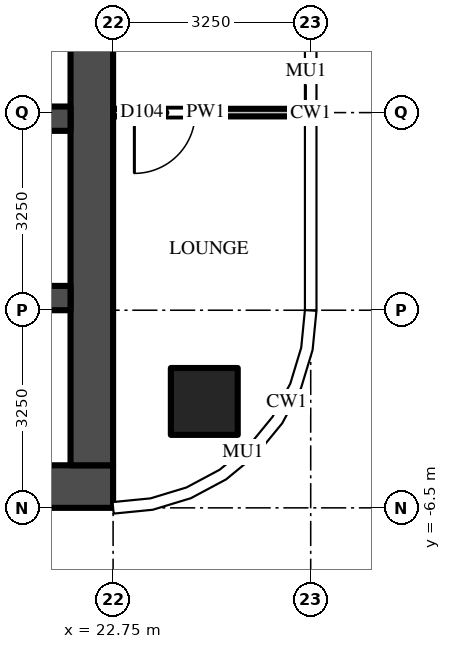
"""IFC4 building model, lengths in metres.
Left out: names, types, materials, properties, quantities, classifications, styles, units other than length and angle.
Written with IfcOpenShell. Run it as: python <this file> out.ifc"""

import sys

from ifc_helpers import new_model, si_unit, direction, frame, frame_2d, origin, origin_2d, place, context, subcontext, project, spatial, rectangle, extrude, source, transform, mapped, element, fill, save


model = new_model("IFC4")
c1 = context("Model", 3, precision=1e-05, world=origin(), true_north=direction((0.0, 1.0)))
c2 = subcontext(c1, "Body", "Model", "MODEL_VIEW")
j1 = project(units=[si_unit("LENGTHUNIT", "METRE"), si_unit("PLANEANGLEUNIT", "RADIAN")], contexts=[c1])
p1 = place(None, origin())
s1 = spatial("IfcSite", under=j1, at=p1, CompositionType="ELEMENT")
p2 = place(p1, origin())
s2 = spatial("IfcBuilding", under=s1, at=p2, CompositionType="ELEMENT")
p3 = place(p2, frame((0.0, 0.0, 244.1)))
s3 = spatial("IfcBuildingStorey", under=s2, at=p3, CompositionType="ELEMENT", Elevation=244.1)
m1 = source(origin(), c2, "Body", "SweptSolid", [
    extrude(rectangle(XDim=1.1, YDim=1.1, at=origin_2d()), origin(), (0.0, 0.0, 1.0), 3.9),
])
p4 = place(p3, frame((24.25, -4.75, 0.0), z_axis=(0.0, 0.0, 1.0), x_axis=(1.0, 0.0, 0.0)))
e1 = element("IfcColumn", 1, at=p4, inside=s3, PredefinedType="COLUMN", context=c2, shape_type="MappedRepresentation", body=[
    mapped(m1, transform((0.0, 0.0, 0.0))),
])
m2 = source(origin(), c2, "Body", "SweptSolid", [
    extrude(rectangle(XDim=16.6, YDim=0.7, at=frame_2d((8.3, 0.0))), origin(), (0.0, 0.0, 1.0), 3.7),
])
p5 = place(p3, frame((6.15, -6.15, 0.0), z_axis=(0.0, 0.0, 1.0), x_axis=(1.0, 0.0, 0.0)))
e2 = element("IfcWall", 2, at=p5, inside=s3, PredefinedType="SHEAR", context=c2, shape_type="MappedRepresentation", body=[
    mapped(m2, transform((0.0, 0.0, 0.0))),
])
m3 = source(origin(), c2, "Body", "SweptSolid", [
    extrude(rectangle(XDim=9.05, YDim=0.7, at=frame_2d((4.525, 0.0))), origin(), (0.0, 0.0, 1.0), 3.7),
])
p6 = place(p3, frame((22.4, -5.8, 0.0), z_axis=(0.0, 0.0, 1.0), x_axis=(0.0, 1.0, 0.0)))
e3 = element("IfcWall", 3, at=p6, inside=s3, PredefinedType="SHEAR", context=c2, shape_type="MappedRepresentation", body=[
    mapped(m3, transform((0.0, 0.0, 0.0))),
])
m4 = source(origin(), c2, "Body", "SweptSolid", [
    extrude(rectangle(XDim=14.85, YDim=0.4, at=frame_2d((7.425, 0.0))), origin(), (0.0, 0.0, 1.0), 3.7),
])
p7 = place(p3, frame((7.2, -0.1, 0.0), z_axis=(0.0, 0.0, 1.0), x_axis=(1.0, 0.0, 0.0)))
e4 = element("IfcWall", 4, at=p7, inside=s3, PredefinedType="SHEAR", context=c2, shape_type="MappedRepresentation", body=[
    mapped(m4, transform((0.0, 0.0, 0.0))),
])
m5 = source(origin(), c2, "Body", "SweptSolid", [
    extrude(rectangle(XDim=1.0, YDim=2.1, at=frame_2d((0.5, 1.05))), frame((0.0, 0.21, 0.0), z_axis=(0.0, -1.0, 0.0), x_axis=(1.0, 0.0, 0.0)), (0.0, 0.0, 1.0), 0.42),
])
p8 = place(p7, frame((7.9, 0.0, 0.0)))
e5 = element("IfcOpeningElement", 5, at=p8, cuts=e4, PredefinedType="OPENING", context=c2, shape_type="MappedRepresentation", body=[
    mapped(m5, transform((0.0, 0.0, 0.0))),
])
m6 = source(origin(), c2, "Body", "SweptSolid", [
    extrude(rectangle(XDim=5.7, YDim=0.4, at=frame_2d((2.85, 0.0))), origin(), (0.0, 0.0, 1.0), 3.7),
])
p9 = place(p3, frame((16.35, -3.05, 0.0), z_axis=(0.0, 0.0, 1.0), x_axis=(1.0, 0.0, 0.0)))
e6 = element("IfcWall", 6, at=p9, inside=s3, PredefinedType="SHEAR", context=c2, shape_type="MappedRepresentation", body=[
    mapped(m6, transform((0.0, 0.0, 0.0))),
])
m7 = source(origin(), c2, "Body", "SweptSolid", [
    extrude(rectangle(XDim=3.05, YDim=0.125, at=frame_2d((1.525, 0.0))), origin(), (0.0, 0.0, 1.0), 2.78),
])
p10 = place(p3, frame((25.8, 0.0, 0.0), z_axis=(0.0, 0.0, 1.0), x_axis=(-1.0, 0.0, 0.0)))
e7 = element("IfcWall", 7, at=p10, inside=s3, PredefinedType="PARTITIONING", context=c2, shape_type="MappedRepresentation", body=[
    mapped(m7, transform((0.0, 0.0, 0.0))),
])
m8 = source(origin(), c2, "Body", "SweptSolid", [
    extrude(rectangle(XDim=1.0, YDim=2.1, at=frame_2d((0.5, 1.05))), frame((0.0, 0.073, 0.0), z_axis=(0.0, -1.0, 0.0), x_axis=(1.0, 0.0, 0.0)), (0.0, 0.0, 1.0), 0.145),
])
p11 = place(p10, frame((1.7, 0.0, 0.0)))
e8 = element("IfcOpeningElement", 8, at=p11, cuts=e7, PredefinedType="OPENING", context=c2, shape_type="MappedRepresentation", body=[
    mapped(m8, transform((0.0, 0.0, 0.0))),
])
m9 = source(origin(), c2, "Body", "SweptSolid", [
    extrude(rectangle(XDim=1.0, YDim=2.1, at=frame_2d((0.5, 1.05))), frame((0.0, 0.025, 0.0), z_axis=(0.0, -1.0, 0.0), x_axis=(1.0, 0.0, 0.0)), (0.0, 0.0, 1.0), 0.05),
])
p12 = place(p11, origin())
e9 = element("IfcDoor", 9, at=p12, inside=s3, OperationType="SINGLE_SWING_RIGHT", PredefinedType="DOOR", context=c2, shape_type="MappedRepresentation", body=[
    mapped(m9, transform((0.0, 0.0, 0.0))),
])
fill(e8, e9)
save(model, sys.argv[1])
